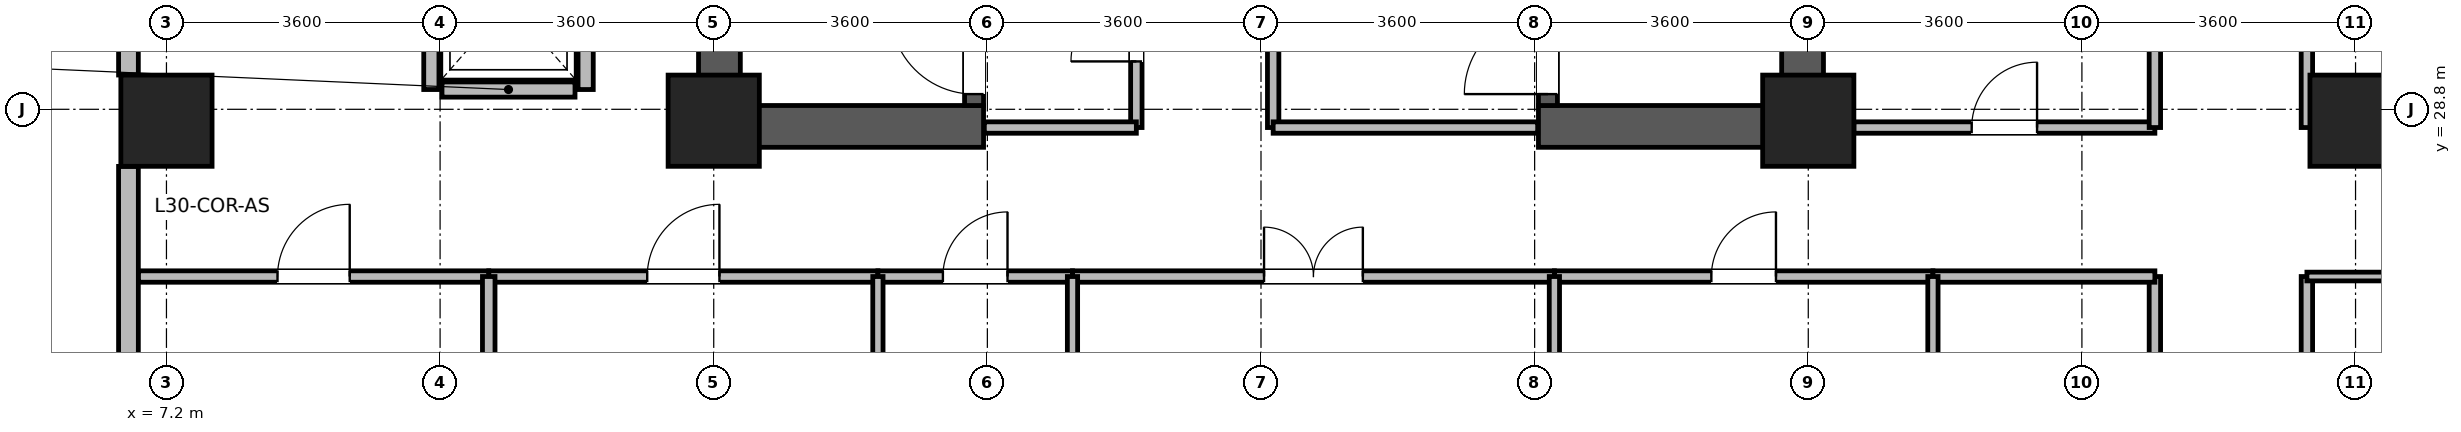
"""IFC4 building model, lengths in metres.
Left out: names, types, materials, properties, quantities, classifications, styles, units other than length and angle.
Written with IfcOpenShell. Run it as: python <this file> out.ifc"""

import sys

from ifc_helpers import new_model, si_unit, direction, frame, frame_2d, origin, origin_2d, place, context, subcontext, project, spatial, rectangle, extrude, source, transform, mapped, element, fill, save


model = new_model("IFC4")
c1 = context("Model", 3, precision=1e-05, world=origin(), true_north=direction((0.0, 1.0)))
c2 = subcontext(c1, "Body", "Model", "MODEL_VIEW")
j1 = project(units=[si_unit("LENGTHUNIT", "METRE"), si_unit("PLANEANGLEUNIT", "RADIAN")], contexts=[c1])
p1 = place(None, origin())
s1 = spatial("IfcSite", under=j1, at=p1, CompositionType="ELEMENT")
p2 = place(p1, origin())
s2 = spatial("IfcBuilding", under=s1, at=p2, CompositionType="ELEMENT")
p3 = place(p2, frame((0.0, 0.0, 119.3)))
s3 = spatial("IfcBuildingStorey", under=s2, at=p3, CompositionType="ELEMENT", Elevation=119.3)
for number, where, z_axis, x_axis in (
    (1, (14.475, 28.3, 0.0), (0.0, 0.0, 1.0), (0.0, 1.0, 0.0)),
    (2, (28.725, 28.3, 0.0), (0.0, 0.0, 1.0), (0.0, 1.0, 0.0)),
):
    element("IfcWall", number, at=place(p3, frame(where, z_axis=z_axis, x_axis=x_axis)), inside=s3, PredefinedType="SHEAR", context=c2, shape_type="SweptSolid", body=[
        extrude(rectangle(XDim=8.1, YDim=0.55, at=frame_2d((4.05, 0.0))), origin(), (0.0, 0.0, 1.0), 3.45),
    ])
for number, where, z_axis, x_axis in (
    (3, (14.75, 28.575, 0.0), (0.0, 0.0, 1.0), (1.0, 0.0, 0.0)),
    (4, (25.25, 28.575, 0.0), (0.0, 0.0, 1.0), (1.0, 0.0, 0.0)),
):
    element("IfcWall", number, at=place(p3, frame(where, z_axis=z_axis, x_axis=x_axis)), inside=s3, PredefinedType="SHEAR", context=c2, shape_type="SweptSolid", body=[
        extrude(rectangle(XDim=3.2, YDim=0.55, at=frame_2d((1.6, 0.0))), origin(), (0.0, 0.0, 1.0), 3.45),
    ])
p4 = place(p3, frame((17.825, 28.85, 0.0), z_axis=(0.0, 0.0, 1.0), x_axis=(0.0, 1.0, 0.0)))
e5 = element("IfcWall", 5, at=p4, inside=s3, PredefinedType="SHEAR", context=c2, shape_type="SweptSolid", body=[
    extrude(rectangle(XDim=7.0, YDim=0.25, at=frame_2d((3.5, 0.0))), origin(), (0.0, 0.0, 1.0), 3.45),
])
p5 = place(p4, frame((0.15, 0.0, 0.0)))
e6 = element("IfcOpeningElement", 6, at=p5, cuts=e5, PredefinedType="OPENING", context=c2, shape_type="SweptSolid", body=[
    extrude(rectangle(XDim=1.1, YDim=2.08, at=frame_2d((0.55, 1.04))), frame((0.0, 0.135, 0.0), z_axis=(0.0, -1.0, 0.0), x_axis=(1.0, 0.0, 0.0)), (0.0, 0.0, 1.0), 0.27),
])
p6 = place(p3, frame((25.375, 28.85, 0.0), z_axis=(0.0, 0.0, 1.0), x_axis=(0.0, 1.0, 0.0)))
e7 = element("IfcWall", 7, at=p6, inside=s3, PredefinedType="SHEAR", context=c2, shape_type="SweptSolid", body=[
    extrude(rectangle(XDim=7.0, YDim=0.25, at=frame_2d((3.5, 0.0))), origin(), (0.0, 0.0, 1.0), 3.45),
])
p7 = place(p6, frame((0.15, 0.0, 0.0)))
e8 = element("IfcOpeningElement", 8, at=p7, cuts=e7, PredefinedType="OPENING", context=c2, shape_type="SweptSolid", body=[
    extrude(rectangle(XDim=1.1, YDim=2.08, at=frame_2d((0.55, 1.04))), frame((0.0, 0.135, 0.0), z_axis=(0.0, -1.0, 0.0), x_axis=(1.0, 0.0, 0.0)), (0.0, 0.0, 1.0), 0.27),
])
m1 = source(origin(), c2, "Body", "SweptSolid", [
    extrude(rectangle(XDim=1.2, YDim=1.2, at=origin_2d()), origin(), (0.0, 0.0, 1.0), 3.7),
])
for number, where, z_axis, x_axis in (
    (9, (7.2, 28.65, 0.0), (0.0, 0.0, 1.0), (1.0, 0.0, 0.0)),
    (10, (14.4, 28.65, 0.0), (0.0, 0.0, 1.0), (1.0, 0.0, 0.0)),
    (11, (28.8, 28.65, 0.0), (0.0, 0.0, 1.0), (1.0, 0.0, 0.0)),
    (12, (36.0, 28.65, 0.0), (0.0, 0.0, 1.0), (1.0, 0.0, 0.0)),
):
    element("IfcColumn", number, at=place(p3, frame(where, z_axis=z_axis, x_axis=x_axis)), inside=s3, PredefinedType="COLUMN", context=c2, shape_type="MappedRepresentation", body=[
        mapped(m1, transform((0.0, 0.0, 0.0), x_axis=(1.0, 0.0, 0.0), y_axis=(0.0, 1.0, 0.0), z_axis=(0.0, 0.0, 1.0), scale=1.0)),
    ])
p8 = place(p3, frame((6.7, 29.251, 0.0), z_axis=(0.0, 0.0, 1.0), x_axis=(0.0, 1.0, 0.0)))
e13 = element("IfcWall", 13, at=p8, inside=s3, PredefinedType="STANDARD", context=c2, shape_type="SweptSolid", body=[
    extrude(rectangle(XDim=6.298, YDim=0.26, at=frame_2d((3.149, 0.0))), origin(), (0.0, 0.0, 1.0), 3.43),
])
p9 = place(p8, frame((0.824, 0.0, 0.85)))
e14 = element("IfcOpeningElement", 14, at=p9, cuts=e13, PredefinedType="OPENING", context=c2, shape_type="SweptSolid", body=[
    extrude(rectangle(XDim=1.5, YDim=1.85, at=frame_2d((0.75, 0.925))), frame((0.0, 0.14, 0.0), z_axis=(0.0, -1.0, 0.0), x_axis=(1.0, 0.0, 0.0)), (0.0, 0.0, 1.0), 0.28),
])
p10 = place(p8, frame((3.973, 0.0, 0.85)))
e15 = element("IfcOpeningElement", 15, at=p10, cuts=e13, PredefinedType="OPENING", context=c2, shape_type="SweptSolid", body=[
    extrude(rectangle(XDim=1.5, YDim=1.85, at=frame_2d((0.75, 0.925))), frame((0.0, 0.14, 0.0), z_axis=(0.0, -1.0, 0.0), x_axis=(1.0, 0.0, 0.0)), (0.0, 0.0, 1.0), 0.28),
])
p11 = place(p3, frame((6.7, 21.47, 0.0), z_axis=(0.0, 0.0, 1.0), x_axis=(0.0, 1.0, 0.0)))
e16 = element("IfcWall", 16, at=p11, inside=s3, PredefinedType="STANDARD", context=c2, shape_type="SweptSolid", body=[
    extrude(rectangle(XDim=6.579, YDim=0.26, at=frame_2d((3.29, 0.0))), origin(), (0.0, 0.0, 1.0), 3.43),
])
p12 = place(p11, frame((0.895, 0.0, 0.85)))
e17 = element("IfcOpeningElement", 17, at=p12, cuts=e16, PredefinedType="OPENING", context=c2, shape_type="SweptSolid", body=[
    extrude(rectangle(XDim=1.5, YDim=1.85, at=frame_2d((0.75, 0.925))), frame((0.0, 0.14, 0.0), z_axis=(0.0, -1.0, 0.0), x_axis=(1.0, 0.0, 0.0)), (0.0, 0.0, 1.0), 0.28),
])
p13 = place(p11, frame((2.814, 0.0, 0.85)))
e18 = element("IfcOpeningElement", 18, at=p13, cuts=e16, PredefinedType="OPENING", context=c2, shape_type="SweptSolid", body=[
    extrude(rectangle(XDim=0.95, YDim=1.75, at=frame_2d((0.475, 0.875))), frame((0.0, 0.14, 0.0), z_axis=(0.0, -1.0, 0.0), x_axis=(1.0, 0.0, 0.0)), (0.0, 0.0, 1.0), 0.28),
])
p14 = place(p3, frame((10.825, 29.06, 0.0), z_axis=(0.0, 0.0, 1.0), x_axis=(1.0, 0.0, 0.0)))
e19 = element("IfcWall", 19, at=p14, inside=s3, PredefinedType="PARTITIONING", context=c2, shape_type="SweptSolid", body=[
    extrude(rectangle(XDim=1.75, YDim=0.2, at=frame_2d((0.875, 0.0))), origin(), (0.0, 0.0, 1.0), 3.43),
])
for number, where, z_axis, x_axis in (
    (20, (10.685, 29.06, 0.0), (0.0, 0.0, 1.0), (0.0, 1.0, 0.0)),
    (21, (12.715, 29.06, 0.0), (0.0, 0.0, 1.0), (0.0, 1.0, 0.0)),
):
    element("IfcWall", number, at=place(p3, frame(where, z_axis=z_axis, x_axis=x_axis)), inside=s3, PredefinedType="PARTITIONING", context=c2, shape_type="SweptSolid", body=[
        extrude(rectangle(XDim=2.28, YDim=0.2, at=frame_2d((1.14, 0.0))), origin(), (0.0, 0.0, 1.0), 3.43),
    ])
p15 = place(p3, frame((35.36, 16.96, 0.0), z_axis=(0.0, 0.0, 1.0), x_axis=(0.0, 1.0, 0.0)))
e22 = element("IfcWall", 22, at=p15, inside=s3, PredefinedType="PARTITIONING", context=c2, shape_type="SweptSolid", body=[
    extrude(rectangle(XDim=9.64, YDim=0.15, at=frame_2d((4.82, 0.0))), origin(), (0.0, 0.0, 1.0), 3.43),
])
p16 = place(p15, frame((2.435, 0.0, 0.0)))
e23 = element("IfcOpeningElement", 23, at=p16, cuts=e22, PredefinedType="OPENING", context=c2, shape_type="SweptSolid", body=[
    extrude(rectangle(XDim=1.3, YDim=2.12, at=frame_2d((0.65, 1.06))), frame((0.0, 0.085, 0.0), z_axis=(0.0, -1.0, 0.0), x_axis=(1.0, 0.0, 0.0)), (0.0, 0.0, 1.0), 0.17),
])
p17 = place(p3, frame((35.36, 28.56, 0.0), z_axis=(0.0, 0.0, 1.0), x_axis=(0.0, 1.0, 0.0)))
e24 = element("IfcWall", 24, at=p17, inside=s3, PredefinedType="PARTITIONING", context=c2, shape_type="SweptSolid", body=[
    extrude(rectangle(XDim=7.68, YDim=0.15, at=frame_2d((3.84, 0.0))), origin(), (0.0, 0.0, 1.0), 3.43),
])
p18 = place(p17, frame((3.19, 0.0, 0.0)))
e25 = element("IfcOpeningElement", 25, at=p18, cuts=e24, PredefinedType="OPENING", context=c2, shape_type="SweptSolid", body=[
    extrude(rectangle(XDim=1.3, YDim=2.12, at=frame_2d((0.65, 1.06))), frame((0.0, 0.085, 0.0), z_axis=(0.0, -1.0, 0.0), x_axis=(1.0, 0.0, 0.0)), (0.0, 0.0, 1.0), 0.17),
])
p19 = place(p3, frame((19.12, 26.6, 0.0), z_axis=(0.0, 0.0, 1.0), x_axis=(1.0, 0.0, 0.0)))
e26 = element("IfcWall", 26, at=p19, inside=s3, PredefinedType="PARTITIONING", context=c2, shape_type="SweptSolid", body=[
    extrude(rectangle(XDim=6.34, YDim=0.15, at=frame_2d((3.17, 0.0))), origin(), (0.0, 0.0, 1.0), 3.43),
])
p20 = place(p19, frame((2.52, 0.0, 0.0)))
e27 = element("IfcOpeningElement", 27, at=p20, cuts=e26, PredefinedType="OPENING", context=c2, shape_type="SweptSolid", body=[
    extrude(rectangle(XDim=1.3, YDim=2.12, at=frame_2d((0.65, 1.06))), frame((0.0, 0.085, 0.0), z_axis=(0.0, -1.0, 0.0), x_axis=(1.0, 0.0, 0.0)), (0.0, 0.0, 1.0), 0.17),
])
p21 = place(p3, frame((11.44, 26.6, 0.0), z_axis=(0.0, 0.0, 1.0), x_axis=(1.0, 0.0, 0.0)))
e28 = element("IfcWall", 28, at=p21, inside=s3, PredefinedType="PARTITIONING", context=c2, shape_type="SweptSolid", body=[
    extrude(rectangle(XDim=5.12, YDim=0.15, at=frame_2d((2.56, 0.0))), origin(), (0.0, 0.0, 1.0), 3.43),
])
p22 = place(p21, frame((2.085, 0.0, 0.0)))
e29 = element("IfcOpeningElement", 29, at=p22, cuts=e28, PredefinedType="OPENING", context=c2, shape_type="SweptSolid", body=[
    extrude(rectangle(XDim=0.95, YDim=2.1, at=frame_2d((0.475, 1.05))), frame((0.0, 0.085, 0.0), z_axis=(0.0, -1.0, 0.0), x_axis=(1.0, 0.0, 0.0)), (0.0, 0.0, 1.0), 0.17),
])
p23 = place(p3, frame((33.36, 21.6, 0.0), z_axis=(0.0, 0.0, 1.0), x_axis=(0.0, 1.0, 0.0)))
e30 = element("IfcWall", 30, at=p23, inside=s3, PredefinedType="PARTITIONING", context=c2, shape_type="SweptSolid", body=[
    extrude(rectangle(XDim=5.0, YDim=0.15, at=frame_2d((2.5, 0.0))), origin(), (0.0, 0.0, 1.0), 3.43),
])
p24 = place(p23, frame((2.07, 0.0, 0.0)))
e31 = element("IfcOpeningElement", 31, at=p24, cuts=e30, PredefinedType="OPENING", context=c2, shape_type="SweptSolid", body=[
    extrude(rectangle(XDim=0.86, YDim=2.02, at=frame_2d((0.43, 1.01))), frame((0.0, 0.085, 0.0), z_axis=(0.0, -1.0, 0.0), x_axis=(1.0, 0.0, 0.0)), (0.0, 0.0, 1.0), 0.17),
])
p25 = place(p3, frame((25.46, 26.6, 0.0), z_axis=(0.0, 0.0, 1.0), x_axis=(1.0, 0.0, 0.0)))
e32 = element("IfcWall", 32, at=p25, inside=s3, PredefinedType="PARTITIONING", context=c2, shape_type="SweptSolid", body=[
    extrude(rectangle(XDim=4.98, YDim=0.15, at=frame_2d((2.49, 0.0))), origin(), (0.0, 0.0, 1.0), 3.43),
])
p26 = place(p25, frame((2.065, 0.0, 0.0)))
e33 = element("IfcOpeningElement", 33, at=p26, cuts=e32, PredefinedType="OPENING", context=c2, shape_type="SweptSolid", body=[
    extrude(rectangle(XDim=0.85, YDim=2.04, at=frame_2d((0.425, 1.02))), frame((0.0, 0.085, 0.0), z_axis=(0.0, -1.0, 0.0), x_axis=(1.0, 0.0, 0.0)), (0.0, 0.0, 1.0), 0.17),
])
p27 = place(p3, frame((6.832, 26.6, 0.0), z_axis=(0.0, 0.0, 1.0), x_axis=(1.0, 0.0, 0.0)))
e34 = element("IfcWall", 34, at=p27, inside=s3, PredefinedType="PARTITIONING", context=c2, shape_type="SweptSolid", body=[
    extrude(rectangle(XDim=4.608, YDim=0.15, at=frame_2d((2.304, 0.0))), origin(), (0.0, 0.0, 1.0), 3.43),
])
p28 = place(p27, frame((1.829, 0.0, 0.0)))
e35 = element("IfcOpeningElement", 35, at=p28, cuts=e34, PredefinedType="OPENING", context=c2, shape_type="SweptSolid", body=[
    extrude(rectangle(XDim=0.95, YDim=2.1, at=frame_2d((0.475, 1.05))), frame((0.0, 0.085, 0.0), z_axis=(0.0, -1.0, 0.0), x_axis=(1.0, 0.0, 0.0)), (0.0, 0.0, 1.0), 0.17),
])
p29 = place(p3, frame((29.4, 28.56, 0.0), z_axis=(0.0, 0.0, 1.0), x_axis=(1.0, 0.0, 0.0)))
e36 = element("IfcWall", 36, at=p29, inside=s3, PredefinedType="PARTITIONING", context=c2, shape_type="SweptSolid", body=[
    extrude(rectangle(XDim=3.96, YDim=0.15, at=frame_2d((1.98, 0.0))), origin(), (0.0, 0.0, 1.0), 2.78),
])
p30 = place(p29, frame((1.55, 0.0, 0.0)))
e37 = element("IfcOpeningElement", 37, at=p30, cuts=e36, PredefinedType="OPENING", context=c2, shape_type="SweptSolid", body=[
    extrude(rectangle(XDim=0.86, YDim=2.02, at=frame_2d((0.43, 1.01))), frame((0.0, 0.085, 0.0), z_axis=(0.0, -1.0, 0.0), x_axis=(1.0, 0.0, 0.0)), (0.0, 0.0, 1.0), 0.17),
])
p31 = place(p3, frame((33.36, 28.56, 0.0), z_axis=(0.0, 0.0, 1.0), x_axis=(0.0, 1.0, 0.0)))
e38 = element("IfcWall", 38, at=p31, inside=s3, PredefinedType="PARTITIONING", context=c2, shape_type="SweptSolid", body=[
    extrude(rectangle(XDim=3.84, YDim=0.15, at=frame_2d((1.92, 0.0))), origin(), (0.0, 0.0, 1.0), 3.43),
])
p32 = place(p3, frame((30.44, 26.6, 0.0), z_axis=(0.0, 0.0, 1.0), x_axis=(1.0, 0.0, 0.0)))
e39 = element("IfcWall", 39, at=p32, inside=s3, PredefinedType="PARTITIONING", context=c2, shape_type="SweptSolid", body=[
    extrude(rectangle(XDim=2.92, YDim=0.15, at=frame_2d((1.46, 0.0))), origin(), (0.0, 0.0, 1.0), 3.43),
])
p33 = place(p3, frame((19.96, 28.56, 0.0), z_axis=(0.0, 0.0, 1.0), x_axis=(0.0, 1.0, 0.0)))
e40 = element("IfcWall", 40, at=p33, inside=s3, PredefinedType="PARTITIONING", context=c2, shape_type="SweptSolid", body=[
    extrude(rectangle(XDim=2.6, YDim=0.15, at=frame_2d((1.3, 0.0))), origin(), (0.0, 0.0, 1.0), 3.43),
])
p34 = place(p33, frame((0.87, 0.0, 0.0)))
e41 = element("IfcOpeningElement", 41, at=p34, cuts=e40, PredefinedType="OPENING", context=c2, shape_type="SweptSolid", body=[
    extrude(rectangle(XDim=0.86, YDim=2.02, at=frame_2d((0.43, 1.01))), frame((0.0, 0.085, 0.0), z_axis=(0.0, -1.0, 0.0), x_axis=(1.0, 0.0, 0.0)), (0.0, 0.0, 1.0), 0.17),
])
p35 = place(p3, frame((16.56, 26.6, 0.0), z_axis=(0.0, 0.0, 1.0), x_axis=(1.0, 0.0, 0.0)))
e42 = element("IfcWall", 42, at=p35, inside=s3, PredefinedType="PARTITIONING", context=c2, shape_type="SweptSolid", body=[
    extrude(rectangle(XDim=2.56, YDim=0.15, at=frame_2d((1.28, 0.0))), origin(), (0.0, 0.0, 1.0), 3.43),
])
p36 = place(p35, frame((0.855, 0.0, 0.0)))
e43 = element("IfcOpeningElement", 43, at=p36, cuts=e42, PredefinedType="OPENING", context=c2, shape_type="SweptSolid", body=[
    extrude(rectangle(XDim=0.85, YDim=2.04, at=frame_2d((0.425, 1.02))), frame((0.0, 0.085, 0.0), z_axis=(0.0, -1.0, 0.0), x_axis=(1.0, 0.0, 0.0)), (0.0, 0.0, 1.0), 0.17),
])
p37 = place(p3, frame((17.96, 28.56, 0.0), z_axis=(0.0, 0.0, 1.0), x_axis=(1.0, 0.0, 0.0)))
e44 = element("IfcWall", 44, at=p37, inside=s3, PredefinedType="PARTITIONING", context=c2, shape_type="SweptSolid", body=[
    extrude(rectangle(XDim=2.0, YDim=0.15, at=frame_2d((1.0, 0.0))), origin(), (0.0, 0.0, 1.0), 2.43),
])
p38 = place(p3, frame((11.44, 21.732, 0.0), z_axis=(0.0, 0.0, 1.0), x_axis=(0.0, 1.0, 0.0)))
e45 = element("IfcWall", 45, at=p38, inside=s3, PredefinedType="PARTITIONING", context=c2, shape_type="SweptSolid", body=[
    extrude(rectangle(XDim=4.868, YDim=0.165, at=frame_2d((2.434, 0.0))), origin(), (0.0, 0.0, 1.0), 3.43),
])
for number, where, z_axis, x_axis in (
    (46, (16.56, 21.732, 0.0), (0.0, 0.0, 1.0), (0.0, 1.0, 0.0)),
    (47, (19.12, 21.732, 0.0), (0.0, 0.0, 1.0), (0.0, 1.0, 0.0)),
    (48, (25.46, 21.732, 0.0), (0.0, 0.0, 1.0), (0.0, 1.0, 0.0)),
    (49, (30.44, 21.732, 0.0), (0.0, 0.0, 1.0), (0.0, 1.0, 0.0)),
):
    element("IfcWall", number, at=place(p3, frame(where, z_axis=z_axis, x_axis=x_axis)), inside=s3, PredefinedType="PARTITIONING", context=c2, shape_type="SweptSolid", body=[
        extrude(rectangle(XDim=4.868, YDim=0.135, at=frame_2d((2.434, 0.0))), origin(), (0.0, 0.0, 1.0), 3.43),
    ])
p39 = place(p3, frame((21.76, 28.56, 0.0), z_axis=(0.0, 0.0, 1.0), x_axis=(0.0, 1.0, 0.0)))
e50 = element("IfcWall", 50, at=p39, inside=s3, PredefinedType="PARTITIONING", context=c2, shape_type="SweptSolid", body=[
    extrude(rectangle(XDim=4.6, YDim=0.15, at=frame_2d((2.3, 0.0))), origin(), (0.0, 0.0, 1.0), 3.43),
])
p40 = place(p39, frame((1.55, 0.0, 0.0)))
e51 = element("IfcOpeningElement", 51, at=p40, cuts=e50, PredefinedType="OPENING", context=c2, shape_type="SweptSolid", body=[
    extrude(rectangle(XDim=1.5, YDim=2.1, at=frame_2d((0.75, 1.05))), frame((0.0, 0.085, 0.0), z_axis=(0.0, -1.0, 0.0), x_axis=(1.0, 0.0, 0.0)), (0.0, 0.0, 1.0), 0.17),
])
p41 = place(p3, frame((21.76, 28.56, 0.0), z_axis=(0.0, 0.0, 1.0), x_axis=(1.0, 0.0, 0.0)))
e52 = element("IfcWall", 52, at=p41, inside=s3, PredefinedType="PARTITIONING", context=c2, shape_type="SweptSolid", body=[
    extrude(rectangle(XDim=3.48, YDim=0.15, at=frame_2d((1.74, 0.0))), origin(), (0.0, 0.0, 1.0), 2.43),
])
p42 = place(p3, frame((35.36, 26.6, 0.0), z_axis=(0.0, 0.0, 1.0), x_axis=(1.0, 0.0, 0.0)))
e53 = element("IfcWall", 53, at=p42, inside=s3, PredefinedType="PARTITIONING", context=c2, shape_type="SweptSolid", body=[
    extrude(rectangle(XDim=3.26, YDim=0.115, at=frame_2d((1.63, 0.0))), origin(), (0.0, 0.0, 1.0), 3.43),
])
p43 = place(p5, origin())
e54 = element("IfcDoor", 54, at=p43, inside=s3, OperationType="SINGLE_SWING_RIGHT", PredefinedType="DOOR", context=c2, shape_type="SweptSolid", body=[
    extrude(rectangle(XDim=1.1, YDim=2.08, at=frame_2d((0.55, 1.04))), frame((0.0, 0.025, 0.0), z_axis=(0.0, -1.0, 0.0), x_axis=(1.0, 0.0, 0.0)), (0.0, 0.0, 1.0), 0.05),
])
fill(e6, e54)
p44 = place(p7, origin())
e55 = element("IfcDoor", 55, at=p44, inside=s3, OperationType="SINGLE_SWING_LEFT", PredefinedType="DOOR", context=c2, shape_type="SweptSolid", body=[
    extrude(rectangle(XDim=1.1, YDim=2.08, at=frame_2d((0.55, 1.04))), frame((0.0, 0.025, 0.0), z_axis=(0.0, -1.0, 0.0), x_axis=(1.0, 0.0, 0.0)), (0.0, 0.0, 1.0), 0.05),
])
fill(e8, e55)
p45 = place(p20, origin())
e56 = element("IfcDoor", 56, at=p45, inside=s3, OperationType="DOUBLE_DOOR_SINGLE_SWING", PredefinedType="DOOR", context=c2, shape_type="SweptSolid", body=[
    extrude(rectangle(XDim=1.3, YDim=2.12, at=frame_2d((0.65, 1.06))), frame((0.0, 0.025, 0.0), z_axis=(0.0, -1.0, 0.0), x_axis=(1.0, 0.0, 0.0)), (0.0, 0.0, 1.0), 0.05),
])
fill(e27, e56)
p46 = place(p22, origin())
e57 = element("IfcDoor", 57, at=p46, inside=s3, OperationType="SINGLE_SWING_RIGHT", PredefinedType="DOOR", context=c2, shape_type="SweptSolid", body=[
    extrude(rectangle(XDim=0.95, YDim=2.1, at=frame_2d((0.475, 1.05))), frame((0.0, 0.025, 0.0), z_axis=(0.0, -1.0, 0.0), x_axis=(1.0, 0.0, 0.0)), (0.0, 0.0, 1.0), 0.05),
])
fill(e29, e57)
p47 = place(p26, origin())
e58 = element("IfcDoor", 58, at=p47, inside=s3, OperationType="SINGLE_SWING_RIGHT", PredefinedType="DOOR", context=c2, shape_type="SweptSolid", body=[
    extrude(rectangle(XDim=0.85, YDim=2.04, at=frame_2d((0.425, 1.02))), frame((0.0, 0.025, 0.0), z_axis=(0.0, -1.0, 0.0), x_axis=(1.0, 0.0, 0.0)), (0.0, 0.0, 1.0), 0.05),
])
fill(e33, e58)
p48 = place(p28, origin())
e59 = element("IfcDoor", 59, at=p48, inside=s3, OperationType="SINGLE_SWING_RIGHT", PredefinedType="DOOR", context=c2, shape_type="SweptSolid", body=[
    extrude(rectangle(XDim=0.95, YDim=2.1, at=frame_2d((0.475, 1.05))), frame((0.0, 0.025, 0.0), z_axis=(0.0, -1.0, 0.0), x_axis=(1.0, 0.0, 0.0)), (0.0, 0.0, 1.0), 0.05),
])
fill(e35, e59)
p49 = place(p30, origin())
e60 = element("IfcDoor", 60, at=p49, inside=s3, OperationType="SINGLE_SWING_RIGHT", PredefinedType="DOOR", context=c2, shape_type="SweptSolid", body=[
    extrude(rectangle(XDim=0.86, YDim=2.02, at=frame_2d((0.43, 1.01))), frame((0.0, 0.025, 0.0), z_axis=(0.0, -1.0, 0.0), x_axis=(1.0, 0.0, 0.0)), (0.0, 0.0, 1.0), 0.05),
])
fill(e37, e60)
p50 = place(p34, origin())
e61 = element("IfcDoor", 61, at=p50, inside=s3, OperationType="SINGLE_SWING_LEFT", PredefinedType="DOOR", context=c2, shape_type="SweptSolid", body=[
    extrude(rectangle(XDim=0.86, YDim=2.02, at=frame_2d((0.43, 1.01))), frame((0.0, 0.025, 0.0), z_axis=(0.0, -1.0, 0.0), x_axis=(1.0, 0.0, 0.0)), (0.0, 0.0, 1.0), 0.05),
])
fill(e41, e61)
p51 = place(p36, origin())
e62 = element("IfcDoor", 62, at=p51, inside=s3, OperationType="SINGLE_SWING_RIGHT", PredefinedType="DOOR", context=c2, shape_type="SweptSolid", body=[
    extrude(rectangle(XDim=0.85, YDim=2.04, at=frame_2d((0.425, 1.02))), frame((0.0, 0.025, 0.0), z_axis=(0.0, -1.0, 0.0), x_axis=(1.0, 0.0, 0.0)), (0.0, 0.0, 1.0), 0.05),
])
fill(e43, e62)
save(model, sys.argv[1])
